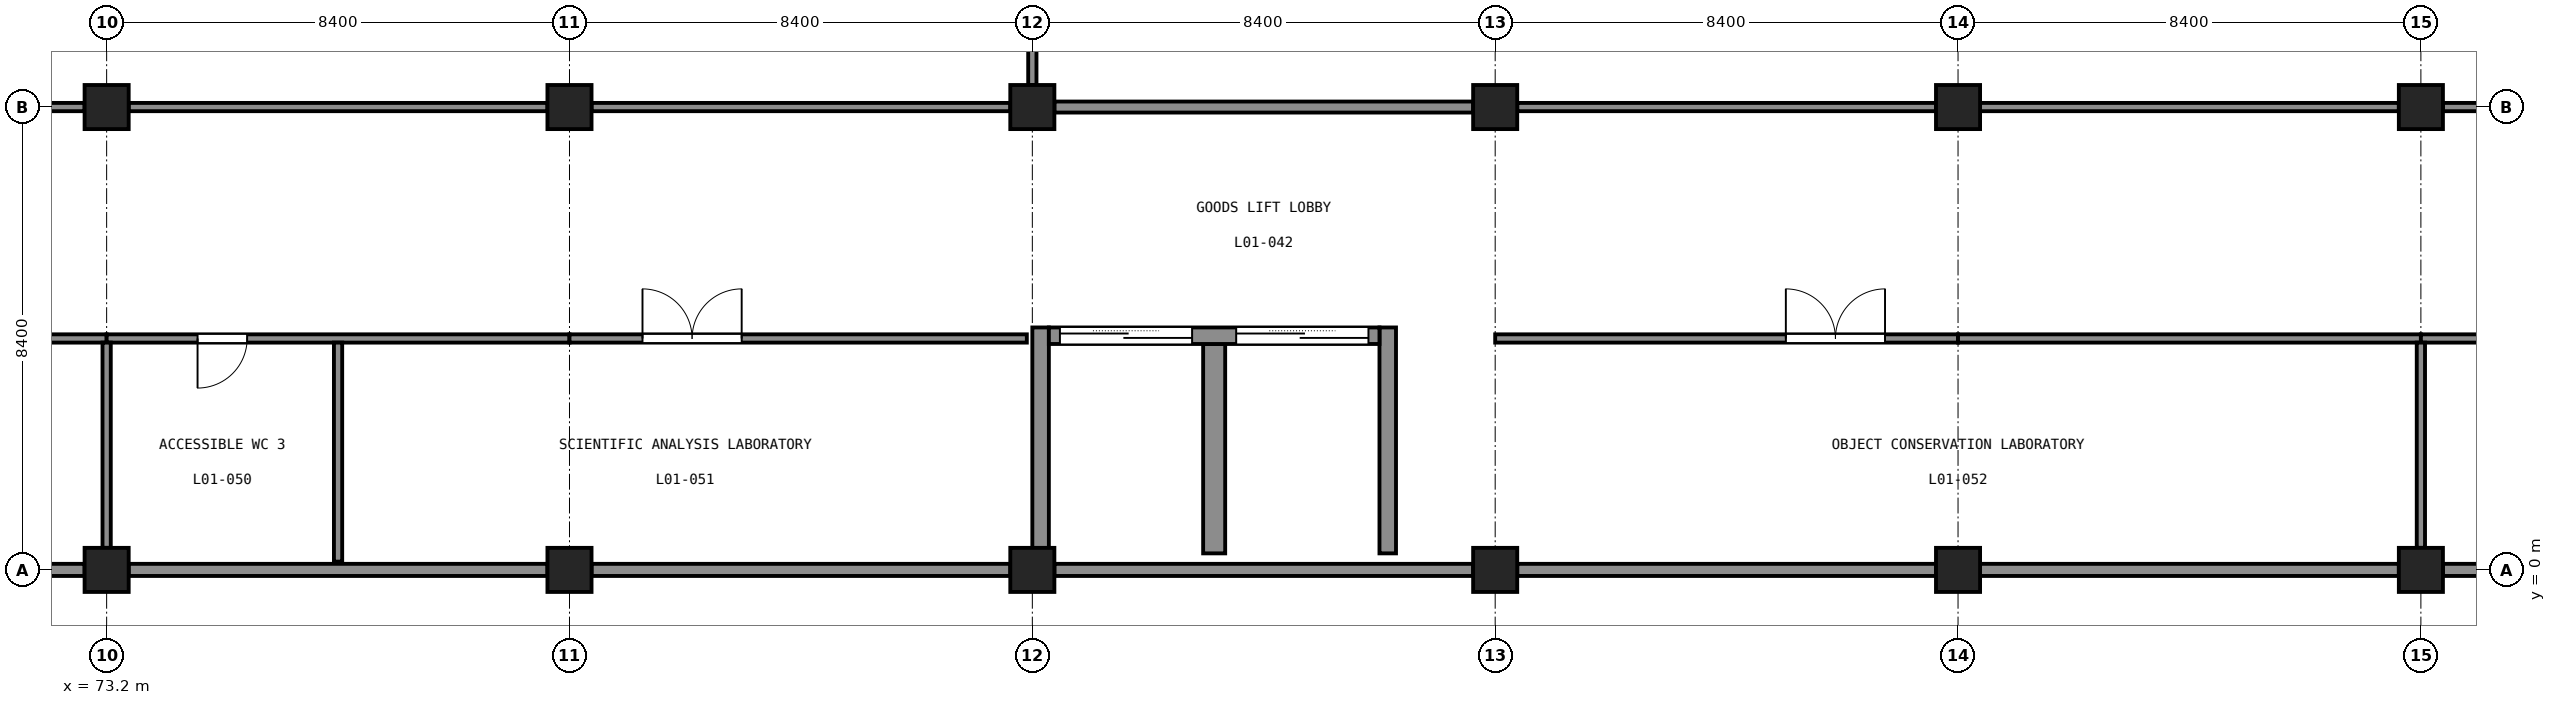
"""IFC4 building model, lengths in metres.
Left out: names, types, materials, properties, quantities, classifications, styles, units other than length and angle.
Written with IfcOpenShell. Run it as: python <this file> out.ifc"""

import sys

from ifc_helpers import new_model, si_unit, direction, frame, frame_2d, origin, origin_2d, place, context, subcontext, project, spatial, rectangle, extrude, element, fill, save


model = new_model("IFC4")
c1 = context("Model", 3, precision=1e-05, world=origin(), true_north=direction((0.0, 1.0)))
c2 = subcontext(c1, "Body", "Model", "MODEL_VIEW")
j1 = project(units=[si_unit("LENGTHUNIT", "METRE"), si_unit("PLANEANGLEUNIT", "RADIAN")], contexts=[c1])
p1 = place(None, origin())
s1 = spatial("IfcSite", under=j1, at=p1, CompositionType="ELEMENT")
p2 = place(p1, origin())
s2 = spatial("IfcBuilding", under=s1, at=p2, CompositionType="ELEMENT")
p3 = place(p2, frame((0.0, 0.0, 5.5)))
s3 = spatial("IfcBuildingStorey", under=s2, at=p3, CompositionType="ELEMENT", Elevation=5.5)
for number, where, z_axis, x_axis in (
    (1, (90.15, 0.3, 0.0), (0.0, 0.0, 1.0), (0.0, 1.0, 0.0)),
    (2, (96.45, 0.3, 0.0), (0.0, 0.0, 1.0), (0.0, 1.0, 0.0)),
):
    element("IfcWall", number, at=place(p3, frame(where, z_axis=z_axis, x_axis=x_axis)), inside=s3, PredefinedType="SHEAR", context=c2, shape_type="SweptSolid", body=[
        extrude(rectangle(XDim=4.1, YDim=0.3, at=frame_2d((2.05, 0.0))), origin(), (0.0, 0.0, 1.0), 5.0),
    ])
p4 = place(p3, frame((90.3, 4.25, 0.0), z_axis=(0.0, 0.0, 1.0), x_axis=(1.0, 0.0, 0.0)))
e3 = element("IfcWall", 3, at=p4, inside=s3, PredefinedType="SHEAR", context=c2, shape_type="SweptSolid", body=[
    extrude(rectangle(XDim=6.0, YDim=0.3, at=frame_2d((3.0, 0.0))), origin(), (0.0, 0.0, 1.0), 5.0),
])
p5 = place(p4, frame((0.2, 0.0, 0.0)))
e4 = element("IfcOpeningElement", 4, at=p5, cuts=e3, PredefinedType="OPENING", context=c2, shape_type="SweptSolid", body=[
    extrude(rectangle(XDim=2.4, YDim=2.4, at=frame_2d((1.2, 1.2))), frame((0.0, 0.16, 0.0), z_axis=(0.0, -1.0, 0.0), x_axis=(1.0, 0.0, 0.0)), (0.0, 0.0, 1.0), 0.32),
])
p6 = place(p4, frame((3.4, 0.0, 0.0)))
e5 = element("IfcOpeningElement", 5, at=p6, cuts=e3, PredefinedType="OPENING", context=c2, shape_type="SweptSolid", body=[
    extrude(rectangle(XDim=2.4, YDim=2.4, at=frame_2d((1.2, 1.2))), frame((0.0, 0.16, 0.0), z_axis=(0.0, -1.0, 0.0), x_axis=(1.0, 0.0, 0.0)), (0.0, 0.0, 1.0), 0.32),
])
p7 = place(p3, frame((93.3, 0.3, 0.0), z_axis=(0.0, 0.0, 1.0), x_axis=(0.0, 1.0, 0.0)))
e6 = element("IfcWall", 6, at=p7, inside=s3, PredefinedType="SHEAR", context=c2, shape_type="SweptSolid", body=[
    extrude(rectangle(XDim=3.8, YDim=0.4, at=frame_2d((1.9, 0.0))), origin(), (0.0, 0.0, 1.0), 5.0),
])
for number, where, z_axis, x_axis in (
    (7, (73.2, 0.0, 0.0), (0.0, 0.0, 1.0), (1.0, 0.0, 0.0)),
    (8, (73.2, 8.4, 0.0), (0.0, 0.0, 1.0), (1.0, 0.0, 0.0)),
    (9, (81.6, 0.0, 0.0), (0.0, 0.0, 1.0), (1.0, 0.0, 0.0)),
    (10, (81.6, 8.4, 0.0), (0.0, 0.0, 1.0), (1.0, 0.0, 0.0)),
    (11, (90.0, 0.0, 0.0), (0.0, 0.0, 1.0), (1.0, 0.0, 0.0)),
    (12, (90.0, 8.4, 0.0), (0.0, 0.0, 1.0), (1.0, 0.0, 0.0)),
    (13, (98.4, 0.0, 0.0), (0.0, 0.0, 1.0), (1.0, 0.0, 0.0)),
    (14, (98.4, 8.4, 0.0), (0.0, 0.0, 1.0), (1.0, 0.0, 0.0)),
    (15, (106.8, 0.0, 0.0), (0.0, 0.0, 1.0), (1.0, 0.0, 0.0)),
    (16, (106.8, 8.4, 0.0), (0.0, 0.0, 1.0), (1.0, 0.0, 0.0)),
    (17, (115.2, 0.0, 0.0), (0.0, 0.0, 1.0), (1.0, 0.0, 0.0)),
    (18, (115.2, 8.4, 0.0), (0.0, 0.0, 1.0), (1.0, 0.0, 0.0)),
):
    element("IfcColumn", number, at=place(p3, frame(where, z_axis=z_axis, x_axis=x_axis)), inside=s3, PredefinedType="COLUMN", context=c2, shape_type="SweptSolid", body=[
        extrude(rectangle(XDim=0.8, YDim=0.8, at=origin_2d()), origin(), (0.0, 0.0, 1.0), 5.0),
    ])
p8 = place(p3, frame((65.2, 0.0, 0.0), z_axis=(0.0, 0.0, 1.0), x_axis=(1.0, 0.0, 0.0)))
e19 = element("IfcWall", 19, at=p8, inside=s3, PredefinedType="SOLIDWALL", context=c2, shape_type="SweptSolid", body=[
    extrude(rectangle(XDim=7.6, YDim=0.22, at=frame_2d((3.8, 0.0))), origin(), (0.0, 0.0, 1.0), 3.94),
])
p9 = place(p3, frame((73.6, 0.0, 0.0), z_axis=(0.0, 0.0, 1.0), x_axis=(1.0, 0.0, 0.0)))
e20 = element("IfcWall", 20, at=p9, inside=s3, PredefinedType="SOLIDWALL", context=c2, shape_type="SweptSolid", body=[
    extrude(rectangle(XDim=7.6, YDim=0.22, at=frame_2d((3.8, 0.0))), origin(), (0.0, 0.0, 1.0), 3.94),
])
for number, where, z_axis, x_axis in (
    (21, (82.0, 0.0, 0.0), (0.0, 0.0, 1.0), (1.0, 0.0, 0.0)),
    (22, (90.4, 0.0, 0.0), (0.0, 0.0, 1.0), (1.0, 0.0, 0.0)),
):
    element("IfcWall", number, at=place(p3, frame(where, z_axis=z_axis, x_axis=x_axis)), inside=s3, PredefinedType="SOLIDWALL", context=c2, shape_type="SweptSolid", body=[
        extrude(rectangle(XDim=7.6, YDim=0.22, at=frame_2d((3.8, 0.0))), origin(), (0.0, 0.0, 1.0), 3.94),
    ])
p10 = place(p3, frame((98.8, 0.0, 0.0), z_axis=(0.0, 0.0, 1.0), x_axis=(1.0, 0.0, 0.0)))
e23 = element("IfcWall", 23, at=p10, inside=s3, PredefinedType="SOLIDWALL", context=c2, shape_type="SweptSolid", body=[
    extrude(rectangle(XDim=7.6, YDim=0.22, at=frame_2d((3.8, 0.0))), origin(), (0.0, 0.0, 1.0), 3.94),
])
p11 = place(p3, frame((107.2, 0.0, 0.0), z_axis=(0.0, 0.0, 1.0), x_axis=(1.0, 0.0, 0.0)))
e24 = element("IfcWall", 24, at=p11, inside=s3, PredefinedType="SOLIDWALL", context=c2, shape_type="SweptSolid", body=[
    extrude(rectangle(XDim=7.6, YDim=0.22, at=frame_2d((3.8, 0.0))), origin(), (0.0, 0.0, 1.0), 3.94),
])
p12 = place(p3, frame((115.6, 0.0, 0.0), z_axis=(0.0, 0.0, 1.0), x_axis=(1.0, 0.0, 0.0)))
e25 = element("IfcWall", 25, at=p12, inside=s3, PredefinedType="SOLIDWALL", context=c2, shape_type="SweptSolid", body=[
    extrude(rectangle(XDim=7.6, YDim=0.22, at=frame_2d((3.8, 0.0))), origin(), (0.0, 0.0, 1.0), 3.94),
])
p13 = place(p3, frame((90.0, 8.8, 0.0), z_axis=(0.0, 0.0, 1.0), x_axis=(0.0, 1.0, 0.0)))
e26 = element("IfcWall", 26, at=p13, inside=s3, PredefinedType="PARTITIONING", context=c2, shape_type="SweptSolid", body=[
    extrude(rectangle(XDim=7.6, YDim=0.15, at=frame_2d((3.8, 0.0))), origin(), (0.0, 0.0, 1.0), 3.9),
])
p14 = place(p3, frame((64.8, 8.4, 0.0), z_axis=(0.0, 0.0, 1.0), x_axis=(1.0, 0.0, 0.0)))
e27 = element("IfcWall", 27, at=p14, inside=s3, PredefinedType="PARTITIONING", context=c2, shape_type="SweptSolid", body=[
    extrude(rectangle(XDim=8.0, YDim=0.15, at=frame_2d((4.0, 0.0))), origin(), (0.0, 0.0, 1.0), 3.9),
])
p15 = place(p14, frame((1.325, 0.0, 0.0)))
e28 = element("IfcOpeningElement", 28, at=p15, cuts=e27, PredefinedType="OPENING", context=c2, shape_type="SweptSolid", body=[
    extrude(rectangle(XDim=1.8, YDim=2.1, at=frame_2d((0.9, 1.05))), frame((0.0, 0.085, 0.0), z_axis=(0.0, -1.0, 0.0), x_axis=(1.0, 0.0, 0.0)), (0.0, 0.0, 1.0), 0.17),
])
p16 = place(p3, frame((73.6, 8.4, 0.0), z_axis=(0.0, 0.0, 1.0), x_axis=(1.0, 0.0, 0.0)))
e29 = element("IfcWall", 29, at=p16, inside=s3, PredefinedType="PARTITIONING", context=c2, shape_type="SweptSolid", body=[
    extrude(rectangle(XDim=7.6, YDim=0.15, at=frame_2d((3.8, 0.0))), origin(), (0.0, 0.0, 1.0), 3.9),
])
p17 = place(p3, frame((82.0, 8.4, 0.0), z_axis=(0.0, 0.0, 1.0), x_axis=(1.0, 0.0, 0.0)))
e30 = element("IfcWall", 30, at=p17, inside=s3, PredefinedType="PARTITIONING", context=c2, shape_type="SweptSolid", body=[
    extrude(rectangle(XDim=7.6, YDim=0.15, at=frame_2d((3.8, 0.0))), origin(), (0.0, 0.0, 1.0), 3.9),
])
p18 = place(p3, frame((98.8, 8.4, 0.0), z_axis=(0.0, 0.0, 1.0), x_axis=(1.0, 0.0, 0.0)))
e31 = element("IfcWall", 31, at=p18, inside=s3, PredefinedType="PARTITIONING", context=c2, shape_type="SweptSolid", body=[
    extrude(rectangle(XDim=7.6, YDim=0.15, at=frame_2d((3.8, 0.0))), origin(), (0.0, 0.0, 1.0), 3.9),
])
p19 = place(p3, frame((107.2, 8.4, 0.0), z_axis=(0.0, 0.0, 1.0), x_axis=(1.0, 0.0, 0.0)))
e32 = element("IfcWall", 32, at=p19, inside=s3, PredefinedType="PARTITIONING", context=c2, shape_type="SweptSolid", body=[
    extrude(rectangle(XDim=7.6, YDim=0.15, at=frame_2d((3.8, 0.0))), origin(), (0.0, 0.0, 1.0), 3.9),
])
p20 = place(p3, frame((115.6, 8.4, 0.0), z_axis=(0.0, 0.0, 1.0), x_axis=(1.0, 0.0, 0.0)))
e33 = element("IfcWall", 33, at=p20, inside=s3, PredefinedType="PARTITIONING", context=c2, shape_type="SweptSolid", body=[
    extrude(rectangle(XDim=8.0, YDim=0.15, at=frame_2d((4.0, 0.0))), origin(), (0.0, 0.0, 1.0), 3.9),
])
p21 = place(p20, frame((4.875, 0.0, 0.0)))
e34 = element("IfcOpeningElement", 34, at=p21, cuts=e33, PredefinedType="OPENING", context=c2, shape_type="SweptSolid", body=[
    extrude(rectangle(XDim=1.8, YDim=2.1, at=frame_2d((0.9, 1.05))), frame((0.0, 0.085, 0.0), z_axis=(0.0, -1.0, 0.0), x_axis=(1.0, 0.0, 0.0)), (0.0, 0.0, 1.0), 0.17),
])
p22 = place(p3, frame((90.4, 8.4, 0.0), z_axis=(0.0, 0.0, 1.0), x_axis=(1.0, 0.0, 0.0)))
e35 = element("IfcWall", 35, at=p22, inside=s3, PredefinedType="PARTITIONING", context=c2, shape_type="SweptSolid", body=[
    extrude(rectangle(XDim=7.6, YDim=0.2, at=frame_2d((3.8, 0.0))), origin(), (0.0, 0.0, 1.0), 3.9),
])
p23 = place(p3, frame((98.4, 4.2, 0.0), z_axis=(0.0, 0.0, 1.0), x_axis=(1.0, 0.0, 0.0)))
e36 = element("IfcWall", 36, at=p23, inside=s3, PredefinedType="PARTITIONING", context=c2, shape_type="SweptSolid", body=[
    extrude(rectangle(XDim=8.4, YDim=0.15, at=frame_2d((4.2, 0.0))), origin(), (0.0, 0.0, 1.0), 3.9),
])
p24 = place(p23, frame((5.275, 0.0, 0.0)))
e37 = element("IfcOpeningElement", 37, at=p24, cuts=e36, PredefinedType="OPENING", context=c2, shape_type="SweptSolid", body=[
    extrude(rectangle(XDim=1.8, YDim=2.1, at=frame_2d((0.9, 1.05))), frame((0.0, 0.085, 0.0), z_axis=(0.0, -1.0, 0.0), x_axis=(1.0, 0.0, 0.0)), (0.0, 0.0, 1.0), 0.17),
])
p25 = place(p3, frame((106.8, 4.2, 0.0), z_axis=(0.0, 0.0, 1.0), x_axis=(1.0, 0.0, 0.0)))
e38 = element("IfcWall", 38, at=p25, inside=s3, PredefinedType="PARTITIONING", context=c2, shape_type="SweptSolid", body=[
    extrude(rectangle(XDim=8.4, YDim=0.15, at=frame_2d((4.2, 0.0))), origin(), (0.0, 0.0, 1.0), 3.9),
])
p26 = place(p3, frame((115.2, 4.2, 0.0), z_axis=(0.0, 0.0, 1.0), x_axis=(1.0, 0.0, 0.0)))
e39 = element("IfcWall", 39, at=p26, inside=s3, PredefinedType="PARTITIONING", context=c2, shape_type="SweptSolid", body=[
    extrude(rectangle(XDim=8.4, YDim=0.15, at=frame_2d((4.2, 0.0))), origin(), (0.0, 0.0, 1.0), 3.9),
])
p27 = place(p26, frame((1.363, 0.0, 0.0)))
e40 = element("IfcOpeningElement", 40, at=p27, cuts=e39, PredefinedType="OPENING", context=c2, shape_type="SweptSolid", body=[
    extrude(rectangle(XDim=1.8, YDim=2.1, at=frame_2d((0.9, 1.05))), frame((0.0, 0.085, 0.0), z_axis=(0.0, -1.0, 0.0), x_axis=(1.0, 0.0, 0.0)), (0.0, 0.0, 1.0), 0.17),
])
p28 = place(p3, frame((64.8, 4.2, 0.0), z_axis=(0.0, 0.0, 1.0), x_axis=(1.0, 0.0, 0.0)))
e41 = element("IfcWall", 41, at=p28, inside=s3, PredefinedType="PARTITIONING", context=c2, shape_type="SweptSolid", body=[
    extrude(rectangle(XDim=8.4, YDim=0.15, at=frame_2d((4.2, 0.0))), origin(), (0.0, 0.0, 1.0), 3.9),
])
p29 = place(p28, frame((1.65, 0.0, 0.0)))
e42 = element("IfcOpeningElement", 42, at=p29, cuts=e41, PredefinedType="OPENING", context=c2, shape_type="SweptSolid", body=[
    extrude(rectangle(XDim=0.9, YDim=2.1, at=frame_2d((0.45, 1.05))), frame((0.0, 0.085, 0.0), z_axis=(0.0, -1.0, 0.0), x_axis=(1.0, 0.0, 0.0)), (0.0, 0.0, 1.0), 0.17),
])
p30 = place(p28, frame((5.85, 0.0, 0.0)))
e43 = element("IfcOpeningElement", 43, at=p30, cuts=e41, PredefinedType="OPENING", context=c2, shape_type="SweptSolid", body=[
    extrude(rectangle(XDim=0.9, YDim=2.1, at=frame_2d((0.45, 1.05))), frame((0.0, 0.085, 0.0), z_axis=(0.0, -1.0, 0.0), x_axis=(1.0, 0.0, 0.0)), (0.0, 0.0, 1.0), 0.17),
])
p31 = place(p3, frame((73.2, 4.2, 0.0), z_axis=(0.0, 0.0, 1.0), x_axis=(1.0, 0.0, 0.0)))
e44 = element("IfcWall", 44, at=p31, inside=s3, PredefinedType="PARTITIONING", context=c2, shape_type="SweptSolid", body=[
    extrude(rectangle(XDim=8.4, YDim=0.15, at=frame_2d((4.2, 0.0))), origin(), (0.0, 0.0, 1.0), 3.9),
])
p32 = place(p31, frame((1.65, 0.0, 0.0)))
e45 = element("IfcOpeningElement", 45, at=p32, cuts=e44, PredefinedType="OPENING", context=c2, shape_type="SweptSolid", body=[
    extrude(rectangle(XDim=0.9, YDim=2.1, at=frame_2d((0.45, 1.05))), frame((0.0, 0.085, 0.0), z_axis=(0.0, -1.0, 0.0), x_axis=(1.0, 0.0, 0.0)), (0.0, 0.0, 1.0), 0.17),
])
p33 = place(p3, frame((81.6, 4.2, 0.0), z_axis=(0.0, 0.0, 1.0), x_axis=(1.0, 0.0, 0.0)))
e46 = element("IfcWall", 46, at=p33, inside=s3, PredefinedType="PARTITIONING", context=c2, shape_type="SweptSolid", body=[
    extrude(rectangle(XDim=8.3, YDim=0.15, at=frame_2d((4.15, 0.0))), origin(), (0.0, 0.0, 1.0), 3.9),
])
p34 = place(p33, frame((1.325, 0.0, 0.0)))
e47 = element("IfcOpeningElement", 47, at=p34, cuts=e46, PredefinedType="OPENING", context=c2, shape_type="SweptSolid", body=[
    extrude(rectangle(XDim=1.8, YDim=2.1, at=frame_2d((0.9, 1.05))), frame((0.0, 0.085, 0.0), z_axis=(0.0, -1.0, 0.0), x_axis=(1.0, 0.0, 0.0)), (0.0, 0.0, 1.0), 0.17),
])
p35 = place(p3, frame((73.2, 0.4, 0.0), z_axis=(0.0, 0.0, 1.0), x_axis=(0.0, 1.0, 0.0)))
e48 = element("IfcWall", 48, at=p35, inside=s3, PredefinedType="PARTITIONING", context=c2, shape_type="SweptSolid", body=[
    extrude(rectangle(XDim=3.725, YDim=0.15, at=frame_2d((1.863, 0.0))), origin(), (0.0, 0.0, 1.0), 3.9),
])
p36 = place(p3, frame((77.4, 0.15, 0.0), z_axis=(0.0, 0.0, 1.0), x_axis=(0.0, 1.0, 0.0)))
e49 = element("IfcWall", 49, at=p36, inside=s3, PredefinedType="PARTITIONING", context=c2, shape_type="SweptSolid", body=[
    extrude(rectangle(XDim=3.975, YDim=0.15, at=frame_2d((1.988, 0.0))), origin(), (0.0, 0.0, 1.0), 3.9),
])
p37 = place(p3, frame((115.2, 0.4, 0.0), z_axis=(0.0, 0.0, 1.0), x_axis=(0.0, 1.0, 0.0)))
e50 = element("IfcWall", 50, at=p37, inside=s3, PredefinedType="PARTITIONING", context=c2, shape_type="SweptSolid", body=[
    extrude(rectangle(XDim=3.725, YDim=0.15, at=frame_2d((1.863, 0.0))), origin(), (0.0, 0.0, 1.0), 3.9),
])
p38 = place(p32, origin())
e51 = element("IfcDoor", 51, at=p38, inside=s3, OperationType="SINGLE_SWING_LEFT", PredefinedType="DOOR", context=c2, shape_type="SweptSolid", body=[
    extrude(rectangle(XDim=0.9, YDim=2.1, at=frame_2d((0.45, 1.05))), frame((0.0, 0.025, 0.0), z_axis=(0.0, -1.0, 0.0), x_axis=(1.0, 0.0, 0.0)), (0.0, 0.0, 1.0), 0.05),
])
fill(e45, e51)
p39 = place(p34, origin())
e52 = element("IfcDoor", 52, at=p39, inside=s3, OperationType="DOUBLE_DOOR_SINGLE_SWING", PredefinedType="DOOR", context=c2, shape_type="SweptSolid", body=[
    extrude(rectangle(XDim=1.8, YDim=2.1, at=frame_2d((0.9, 1.05))), frame((0.0, 0.025, 0.0), z_axis=(0.0, -1.0, 0.0), x_axis=(1.0, 0.0, 0.0)), (0.0, 0.0, 1.0), 0.05),
])
fill(e47, e52)
p40 = place(p24, origin())
e53 = element("IfcDoor", 53, at=p40, inside=s3, OperationType="DOUBLE_DOOR_SINGLE_SWING", PredefinedType="DOOR", context=c2, shape_type="SweptSolid", body=[
    extrude(rectangle(XDim=1.8, YDim=2.1, at=frame_2d((0.9, 1.05))), frame((0.0, 0.025, 0.0), z_axis=(0.0, -1.0, 0.0), x_axis=(1.0, 0.0, 0.0)), (0.0, 0.0, 1.0), 0.05),
])
fill(e37, e53)
p41 = place(p5, origin())
e54 = element("IfcDoor", 54, at=p41, inside=s3, OperationType="DOUBLE_DOOR_SLIDING", PredefinedType="DOOR", context=c2, shape_type="SweptSolid", body=[
    extrude(rectangle(XDim=2.4, YDim=2.4, at=frame_2d((1.2, 1.2))), frame((0.0, 0.025, 0.0), z_axis=(0.0, -1.0, 0.0), x_axis=(1.0, 0.0, 0.0)), (0.0, 0.0, 1.0), 0.05),
])
fill(e4, e54)
p42 = place(p6, origin())
e55 = element("IfcDoor", 55, at=p42, inside=s3, OperationType="DOUBLE_DOOR_SLIDING", PredefinedType="DOOR", context=c2, shape_type="SweptSolid", body=[
    extrude(rectangle(XDim=2.4, YDim=2.4, at=frame_2d((1.2, 1.2))), frame((0.0, 0.025, 0.0), z_axis=(0.0, -1.0, 0.0), x_axis=(1.0, 0.0, 0.0)), (0.0, 0.0, 1.0), 0.05),
])
fill(e5, e55)
save(model, sys.argv[1])
